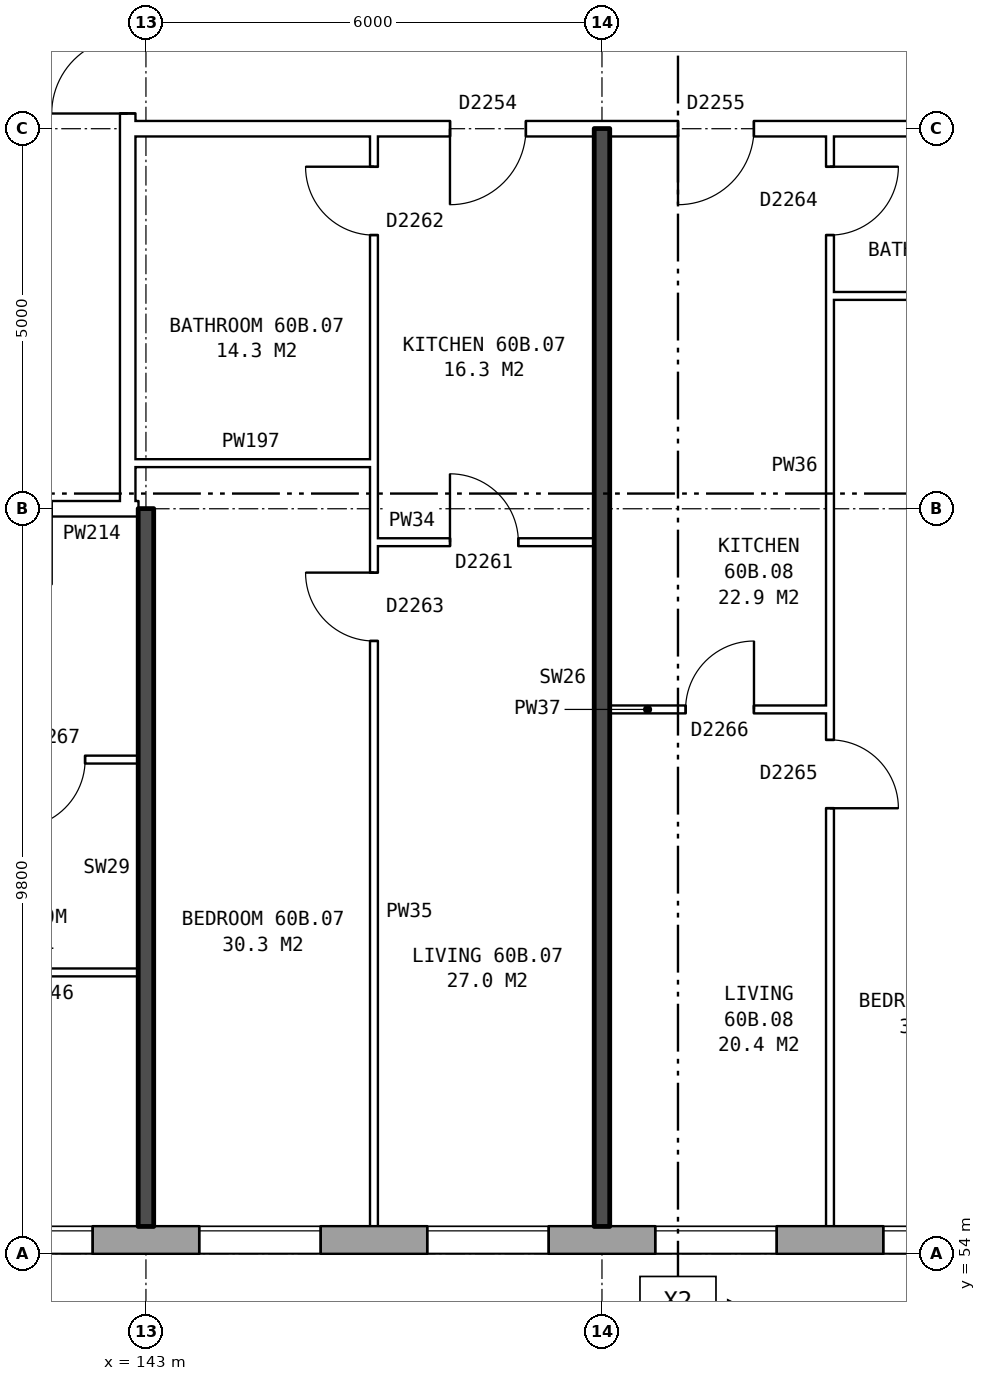
"""IFC4 building model, lengths in metres.
Left out: names, types, materials, properties, quantities, classifications, styles, units other than length and angle.
Written with IfcOpenShell. Run it as: python <this file> out.ifc"""

import sys

from ifc_helpers import new_model, si_unit, direction, frame, frame_2d, origin, place, context, subcontext, project, spatial, rectangle, extrude, element, fill, save


model = new_model("IFC4")
c1 = context("Model", 3, precision=1e-05, world=origin(), true_north=direction((0.0, 1.0)))
c2 = subcontext(c1, "Body", "Model", "MODEL_VIEW")
j1 = project(units=[si_unit("LENGTHUNIT", "METRE"), si_unit("PLANEANGLEUNIT", "RADIAN")], contexts=[c1])
p1 = place(None, origin())
s1 = spatial("IfcSite", under=j1, at=p1, CompositionType="ELEMENT")
p2 = place(p1, origin())
s2 = spatial("IfcBuilding", under=s1, at=p2, CompositionType="ELEMENT")
p3 = place(p2, frame((0.0, 0.0, 212.1)))
s3 = spatial("IfcBuildingStorey", under=s2, at=p3, CompositionType="ELEMENT", Elevation=212.1)
p4 = place(p3, frame((132.05, 54.18, 0.0), z_axis=(0.0, 0.0, 1.0), x_axis=(1.0, 0.0, 0.0)))
e1 = element("IfcWall", 1, at=p4, inside=s3, PredefinedType="STANDARD", context=c2, shape_type="SweptSolid", body=[
    extrude(rectangle(XDim=33.875, YDim=0.36, at=frame_2d((16.938, 0.0))), origin(), (0.0, 0.0, 1.0), 2.85),
])
p5 = place(p4, frame((2.65, 0.0, 0.8)))
e2 = element("IfcOpeningElement", 2, at=p5, cuts=e1, PredefinedType="OPENING", context=c2, shape_type="SweptSolid", body=[
    extrude(rectangle(XDim=1.6, YDim=1.8, at=frame_2d((0.8, 0.9))), frame((0.0, 0.19, 0.0), z_axis=(0.0, -1.0, 0.0), x_axis=(1.0, 0.0, 0.0)), (0.0, 0.0, 1.0), 0.38),
])
p6 = place(p4, frame((6.6, 0.0, 0.8)))
e3 = element("IfcOpeningElement", 3, at=p6, cuts=e1, PredefinedType="OPENING", context=c2, shape_type="SweptSolid", body=[
    extrude(rectangle(XDim=1.6, YDim=1.8, at=frame_2d((0.8, 0.9))), frame((0.0, 0.19, 0.0), z_axis=(0.0, -1.0, 0.0), x_axis=(1.0, 0.0, 0.0)), (0.0, 0.0, 1.0), 0.38),
])
p7 = place(p4, frame((8.65, 0.0, 0.8)))
e4 = element("IfcOpeningElement", 4, at=p7, cuts=e1, PredefinedType="OPENING", context=c2, shape_type="SweptSolid", body=[
    extrude(rectangle(XDim=1.6, YDim=1.8, at=frame_2d((0.8, 0.9))), frame((0.0, 0.19, 0.0), z_axis=(0.0, -1.0, 0.0), x_axis=(1.0, 0.0, 0.0)), (0.0, 0.0, 1.0), 0.38),
])
p8 = place(p4, frame((11.65, 0.0, 0.8)))
e5 = element("IfcOpeningElement", 5, at=p8, cuts=e1, PredefinedType="OPENING", context=c2, shape_type="SweptSolid", body=[
    extrude(rectangle(XDim=1.6, YDim=1.8, at=frame_2d((0.8, 0.9))), frame((0.0, 0.19, 0.0), z_axis=(0.0, -1.0, 0.0), x_axis=(1.0, 0.0, 0.0)), (0.0, 0.0, 1.0), 0.38),
])
p9 = place(p4, frame((14.65, 0.0, 0.8)))
e6 = element("IfcOpeningElement", 6, at=p9, cuts=e1, PredefinedType="OPENING", context=c2, shape_type="SweptSolid", body=[
    extrude(rectangle(XDim=1.6, YDim=1.8, at=frame_2d((0.8, 0.9))), frame((0.0, 0.19, 0.0), z_axis=(0.0, -1.0, 0.0), x_axis=(1.0, 0.0, 0.0)), (0.0, 0.0, 1.0), 0.38),
])
p10 = place(p4, frame((17.65, 0.0, 0.8)))
e7 = element("IfcOpeningElement", 7, at=p10, cuts=e1, PredefinedType="OPENING", context=c2, shape_type="SweptSolid", body=[
    extrude(rectangle(XDim=1.6, YDim=1.8, at=frame_2d((0.8, 0.9))), frame((0.0, 0.19, 0.0), z_axis=(0.0, -1.0, 0.0), x_axis=(1.0, 0.0, 0.0)), (0.0, 0.0, 1.0), 0.38),
])
p11 = place(p4, frame((20.65, 0.0, 0.8)))
e8 = element("IfcOpeningElement", 8, at=p11, cuts=e1, PredefinedType="OPENING", context=c2, shape_type="SweptSolid", body=[
    extrude(rectangle(XDim=1.6, YDim=1.8, at=frame_2d((0.8, 0.9))), frame((0.0, 0.19, 0.0), z_axis=(0.0, -1.0, 0.0), x_axis=(1.0, 0.0, 0.0)), (0.0, 0.0, 1.0), 0.38),
])
p12 = place(p4, frame((23.65, 0.0, 0.8)))
e9 = element("IfcOpeningElement", 9, at=p12, cuts=e1, PredefinedType="OPENING", context=c2, shape_type="SweptSolid", body=[
    extrude(rectangle(XDim=1.6, YDim=1.8, at=frame_2d((0.8, 0.9))), frame((0.0, 0.19, 0.0), z_axis=(0.0, -1.0, 0.0), x_axis=(1.0, 0.0, 0.0)), (0.0, 0.0, 1.0), 0.38),
])
p13 = place(p4, frame((26.65, 0.0, 0.8)))
e10 = element("IfcOpeningElement", 10, at=p13, cuts=e1, PredefinedType="OPENING", context=c2, shape_type="SweptSolid", body=[
    extrude(rectangle(XDim=1.6, YDim=1.8, at=frame_2d((0.8, 0.9))), frame((0.0, 0.19, 0.0), z_axis=(0.0, -1.0, 0.0), x_axis=(1.0, 0.0, 0.0)), (0.0, 0.0, 1.0), 0.38),
])
p14 = place(p4, frame((29.15, 0.0, 0.8)))
e11 = element("IfcOpeningElement", 11, at=p14, cuts=e1, PredefinedType="OPENING", context=c2, shape_type="SweptSolid", body=[
    extrude(rectangle(XDim=0.6, YDim=0.9, at=frame_2d((0.3, 0.45))), frame((0.0, 0.19, 0.0), z_axis=(0.0, -1.0, 0.0), x_axis=(1.0, 0.0, 0.0)), (0.0, 0.0, 1.0), 0.38),
])
p15 = place(p4, frame((31.25, 0.0, 1.1)))
e12 = element("IfcOpeningElement", 12, at=p15, cuts=e1, PredefinedType="OPENING", context=c2, shape_type="SweptSolid", body=[
    extrude(rectangle(XDim=1.4, YDim=1.5, at=frame_2d((0.7, 0.75))), frame((0.0, 0.19, 0.0), z_axis=(0.0, -1.0, 0.0), x_axis=(1.0, 0.0, 0.0)), (0.0, 0.0, 1.0), 0.38),
])
p16 = place(p4, frame((32.95, 0.0, 0.8)))
e13 = element("IfcOpeningElement", 13, at=p16, cuts=e1, PredefinedType="OPENING", context=c2, shape_type="SweptSolid", body=[
    extrude(rectangle(XDim=0.6, YDim=1.8, at=frame_2d((0.3, 0.9))), frame((0.0, 0.19, 0.0), z_axis=(0.0, -1.0, 0.0), x_axis=(1.0, 0.0, 0.0)), (0.0, 0.0, 1.0), 0.38),
])
p17 = place(p3, frame((142.76, 63.9, 0.0), z_axis=(0.0, 0.0, 1.0), x_axis=(0.0, 1.0, 0.0)))
e14 = element("IfcWall", 14, at=p17, inside=s3, PredefinedType="PARTITIONING", context=c2, shape_type="SweptSolid", body=[
    extrude(rectangle(XDim=12.2, YDim=0.2, at=frame_2d((6.1, 0.0))), origin(), (0.0, 0.0, 1.0), 2.85),
])
p18 = place(p17, frame((5.1, 0.0, 0.0)))
e15 = element("IfcOpeningElement", 15, at=p18, cuts=e14, PredefinedType="OPENING", context=c2, shape_type="SweptSolid", body=[
    extrude(rectangle(XDim=2.0, YDim=2.1, at=frame_2d((1.0, 1.05))), frame((0.0, 0.11, 0.0), z_axis=(0.0, -1.0, 0.0), x_axis=(1.0, 0.0, 0.0)), (0.0, 0.0, 1.0), 0.22),
])
p19 = place(p3, frame((140.6, 57.7, 0.0), z_axis=(0.0, 0.0, 1.0), x_axis=(1.0, 0.0, 0.0)))
e16 = element("IfcWall", 16, at=p19, inside=s3, PredefinedType="PARTITIONING", context=c2, shape_type="SweptSolid", body=[
    extrude(rectangle(XDim=2.3, YDim=0.1, at=frame_2d((1.15, 0.0))), origin(), (0.0, 0.0, 1.0), 2.85),
])
p20 = place(p3, frame((131.1, 60.5, 0.0), z_axis=(0.0, 0.0, 1.0), x_axis=(1.0, 0.0, 0.0)))
e17 = element("IfcWall", 17, at=p20, inside=s3, PredefinedType="PARTITIONING", context=c2, shape_type="SweptSolid", body=[
    extrude(rectangle(XDim=11.8, YDim=0.1, at=frame_2d((5.9, 0.0))), origin(), (0.0, 0.0, 1.0), 2.85),
])
p21 = place(p20, frame((7.25, 0.0, 0.0)))
e18 = element("IfcOpeningElement", 18, at=p21, cuts=e17, PredefinedType="OPENING", context=c2, shape_type="SweptSolid", body=[
    extrude(rectangle(XDim=0.9, YDim=2.1, at=frame_2d((0.45, 1.05))), frame((0.0, 0.06, 0.0), z_axis=(0.0, -1.0, 0.0), x_axis=(1.0, 0.0, 0.0)), (0.0, 0.0, 1.0), 0.12),
])
p22 = place(p20, frame((10.2, 0.0, 0.0)))
e19 = element("IfcOpeningElement", 19, at=p22, cuts=e17, PredefinedType="OPENING", context=c2, shape_type="SweptSolid", body=[
    extrude(rectangle(XDim=0.9, YDim=2.1, at=frame_2d((0.45, 1.05))), frame((0.0, 0.06, 0.0), z_axis=(0.0, -1.0, 0.0), x_axis=(1.0, 0.0, 0.0)), (0.0, 0.0, 1.0), 0.12),
])
p23 = place(p3, frame((149.1, 61.16, 0.0), z_axis=(0.0, 0.0, 1.0), x_axis=(1.0, 0.0, 0.0)))
e20 = element("IfcWall", 20, at=p23, inside=s3, PredefinedType="PARTITIONING", context=c2, shape_type="SweptSolid", body=[
    extrude(rectangle(XDim=2.9, YDim=0.1, at=frame_2d((1.45, 0.0))), origin(), (0.0, 0.0, 1.0), 2.85),
])
p24 = place(p23, frame((1.0, 0.0, 0.0)))
e21 = element("IfcOpeningElement", 21, at=p24, cuts=e20, PredefinedType="OPENING", context=c2, shape_type="SweptSolid", body=[
    extrude(rectangle(XDim=0.9, YDim=2.1, at=frame_2d((0.45, 1.05))), frame((0.0, 0.06, 0.0), z_axis=(0.0, -1.0, 0.0), x_axis=(1.0, 0.0, 0.0)), (0.0, 0.0, 1.0), 0.12),
])
p25 = place(p3, frame((146.0, 63.36, 0.0), z_axis=(0.0, 0.0, 1.0), x_axis=(1.0, 0.0, 0.0)))
e22 = element("IfcWall", 22, at=p25, inside=s3, PredefinedType="PARTITIONING", context=c2, shape_type="SweptSolid", body=[
    extrude(rectangle(XDim=2.9, YDim=0.1, at=frame_2d((1.45, 0.0))), origin(), (0.0, 0.0, 1.0), 2.85),
])
p26 = place(p25, frame((1.0, 0.0, 0.0)))
e23 = element("IfcOpeningElement", 23, at=p26, cuts=e22, PredefinedType="OPENING", context=c2, shape_type="SweptSolid", body=[
    extrude(rectangle(XDim=0.9, YDim=2.1, at=frame_2d((0.45, 1.05))), frame((0.0, 0.06, 0.0), z_axis=(0.0, -1.0, 0.0), x_axis=(1.0, 0.0, 0.0)), (0.0, 0.0, 1.0), 0.12),
])
p27 = place(p3, frame((139.76, 63.8, 0.0), z_axis=(0.0, 0.0, 1.0), x_axis=(1.0, 0.0, 0.0)))
e24 = element("IfcWall", 24, at=p27, inside=s3, PredefinedType="PARTITIONING", context=c2, shape_type="SweptSolid", body=[
    extrude(rectangle(XDim=3.0, YDim=0.2, at=frame_2d((1.5, 0.0))), origin(), (0.0, 0.0, 1.0), 2.85),
])
p28 = place(p27, frame((1.0, 0.0, 0.0)))
e25 = element("IfcOpeningElement", 25, at=p28, cuts=e24, PredefinedType="OPENING", context=c2, shape_type="SweptSolid", body=[
    extrude(rectangle(XDim=1.0, YDim=2.1, at=frame_2d((0.5, 1.05))), frame((0.0, 0.11, 0.0), z_axis=(0.0, -1.0, 0.0), x_axis=(1.0, 0.0, 0.0)), (0.0, 0.0, 1.0), 0.22),
])
p29 = place(p3, frame((142.76, 63.8, 0.0), z_axis=(0.0, 0.0, 1.0), x_axis=(1.0, 0.0, 0.0)))
e26 = element("IfcWall", 26, at=p29, inside=s3, PredefinedType="PARTITIONING", context=c2, shape_type="SweptSolid", body=[
    extrude(rectangle(XDim=0.14, YDim=0.2, at=frame_2d((0.07, 0.0))), origin(), (0.0, 0.0, 1.0), 2.85),
])
p30 = place(p3, frame((142.76, 64.4, 0.0), z_axis=(0.0, 0.0, 1.0), x_axis=(1.0, 0.0, 0.0)))
e27 = element("IfcWall", 27, at=p30, inside=s3, PredefinedType="PARTITIONING", context=c2, shape_type="SweptSolid", body=[
    extrude(rectangle(XDim=3.24, YDim=0.1, at=frame_2d((1.62, 0.0))), origin(), (0.0, 0.0, 1.0), 2.85),
])
p31 = place(p3, frame((152.0, 66.6, 0.0), z_axis=(0.0, 0.0, 1.0), x_axis=(1.0, 0.0, 0.0)))
e28 = element("IfcWall", 28, at=p31, inside=s3, PredefinedType="PARTITIONING", context=c2, shape_type="SweptSolid", body=[
    extrude(rectangle(XDim=2.9, YDim=0.1, at=frame_2d((1.45, 0.0))), origin(), (0.0, 0.0, 1.0), 2.85),
])
p32 = place(p3, frame((142.76, 68.8, 0.0), z_axis=(0.0, 0.0, 1.0), x_axis=(1.0, 0.0, 0.0)))
e29 = element("IfcWall", 29, at=p32, inside=s3, PredefinedType="PARTITIONING", context=c2, shape_type="SweptSolid", body=[
    extrude(rectangle(XDim=14.48, YDim=0.2, at=frame_2d((7.24, 0.0))), origin(), (0.0, 0.0, 1.0), 2.85),
])
p33 = place(p32, frame((4.24, 0.0, 0.0)))
e30 = element("IfcOpeningElement", 30, at=p33, cuts=e29, PredefinedType="OPENING", context=c2, shape_type="SweptSolid", body=[
    extrude(rectangle(XDim=1.0, YDim=2.1, at=frame_2d((0.5, 1.05))), frame((0.0, 0.11, 0.0), z_axis=(0.0, -1.0, 0.0), x_axis=(1.0, 0.0, 0.0)), (0.0, 0.0, 1.0), 0.22),
])
p34 = place(p32, frame((7.24, 0.0, 0.0)))
e31 = element("IfcOpeningElement", 31, at=p34, cuts=e29, PredefinedType="OPENING", context=c2, shape_type="SweptSolid", body=[
    extrude(rectangle(XDim=1.0, YDim=2.1, at=frame_2d((0.5, 1.05))), frame((0.0, 0.11, 0.0), z_axis=(0.0, -1.0, 0.0), x_axis=(1.0, 0.0, 0.0)), (0.0, 0.0, 1.0), 0.22),
])
p35 = place(p3, frame((143.0, 54.36, 0.0), z_axis=(0.0, 0.0, 1.0), x_axis=(0.0, 1.0, 0.0)))
e32 = element("IfcWall", 32, at=p35, inside=s3, PredefinedType="SOLIDWALL", context=c2, shape_type="SweptSolid", body=[
    extrude(rectangle(XDim=9.44, YDim=0.2, at=frame_2d((4.72, 0.0))), origin(), (0.0, 0.0, 1.0), 2.85),
])
p36 = place(p3, frame((146.0, 54.36, 0.0), z_axis=(0.0, 0.0, 1.0), x_axis=(0.0, 1.0, 0.0)))
e33 = element("IfcWall", 33, at=p36, inside=s3, PredefinedType="PARTITIONING", context=c2, shape_type="SweptSolid", body=[
    extrude(rectangle(XDim=14.34, YDim=0.1, at=frame_2d((7.17, 0.0))), origin(), (0.0, 0.0, 1.0), 2.85),
])
p37 = place(p36, frame((7.7, 0.0, 0.0)))
e34 = element("IfcOpeningElement", 34, at=p37, cuts=e33, PredefinedType="OPENING", context=c2, shape_type="SweptSolid", body=[
    extrude(rectangle(XDim=0.9, YDim=2.1, at=frame_2d((0.45, 1.05))), frame((0.0, 0.06, 0.0), z_axis=(0.0, -1.0, 0.0), x_axis=(1.0, 0.0, 0.0)), (0.0, 0.0, 1.0), 0.12),
])
p38 = place(p36, frame((13.04, 0.0, 0.0)))
e35 = element("IfcOpeningElement", 35, at=p38, cuts=e33, PredefinedType="OPENING", context=c2, shape_type="SweptSolid", body=[
    extrude(rectangle(XDim=0.9, YDim=2.1, at=frame_2d((0.45, 1.05))), frame((0.0, 0.06, 0.0), z_axis=(0.0, -1.0, 0.0), x_axis=(1.0, 0.0, 0.0)), (0.0, 0.0, 1.0), 0.12),
])
p39 = place(p3, frame((149.0, 54.36, 0.0), z_axis=(0.0, 0.0, 1.0), x_axis=(0.0, 1.0, 0.0)))
e36 = element("IfcWall", 36, at=p39, inside=s3, PredefinedType="SOLIDWALL", context=c2, shape_type="SweptSolid", body=[
    extrude(rectangle(XDim=14.44, YDim=0.2, at=frame_2d((7.22, 0.0))), origin(), (0.0, 0.0, 1.0), 2.85),
])
p40 = place(p3, frame((152.0, 54.36, 0.0), z_axis=(0.0, 0.0, 1.0), x_axis=(0.0, 1.0, 0.0)))
e37 = element("IfcWall", 37, at=p40, inside=s3, PredefinedType="PARTITIONING", context=c2, shape_type="SweptSolid", body=[
    extrude(rectangle(XDim=14.34, YDim=0.1, at=frame_2d((7.17, 0.0))), origin(), (0.0, 0.0, 1.0), 2.85),
])
p41 = place(p40, frame((5.5, 0.0, 0.0)))
e38 = element("IfcOpeningElement", 38, at=p41, cuts=e37, PredefinedType="OPENING", context=c2, shape_type="SweptSolid", body=[
    extrude(rectangle(XDim=0.9, YDim=2.1, at=frame_2d((0.45, 1.05))), frame((0.0, 0.06, 0.0), z_axis=(0.0, -1.0, 0.0), x_axis=(1.0, 0.0, 0.0)), (0.0, 0.0, 1.0), 0.12),
])
p42 = place(p40, frame((13.04, 0.0, 0.0)))
e39 = element("IfcOpeningElement", 39, at=p42, cuts=e37, PredefinedType="OPENING", context=c2, shape_type="SweptSolid", body=[
    extrude(rectangle(XDim=0.9, YDim=2.1, at=frame_2d((0.45, 1.05))), frame((0.0, 0.06, 0.0), z_axis=(0.0, -1.0, 0.0), x_axis=(1.0, 0.0, 0.0)), (0.0, 0.0, 1.0), 0.12),
])
p43 = place(p7, origin())
e40 = element("IfcWindow", 40, at=p43, inside=s3, PartitioningType="SINGLE_PANEL", PredefinedType="WINDOW", context=c2, shape_type="SweptSolid", body=[
    extrude(rectangle(XDim=1.6, YDim=1.8, at=frame_2d((0.8, 0.9))), frame((0.0, 0.15, 0.0), z_axis=(0.0, -1.0, 0.0), x_axis=(1.0, 0.0, 0.0)), (0.0, 0.0, 1.0), 0.06),
])
fill(e4, e40)
p44 = place(p8, origin())
e41 = element("IfcWindow", 41, at=p44, inside=s3, PartitioningType="SINGLE_PANEL", PredefinedType="WINDOW", context=c2, shape_type="SweptSolid", body=[
    extrude(rectangle(XDim=1.6, YDim=1.8, at=frame_2d((0.8, 0.9))), frame((0.0, 0.15, 0.0), z_axis=(0.0, -1.0, 0.0), x_axis=(1.0, 0.0, 0.0)), (0.0, 0.0, 1.0), 0.06),
])
fill(e5, e41)
p45 = place(p9, origin())
e42 = element("IfcWindow", 42, at=p45, inside=s3, PartitioningType="SINGLE_PANEL", PredefinedType="WINDOW", context=c2, shape_type="SweptSolid", body=[
    extrude(rectangle(XDim=1.6, YDim=1.8, at=frame_2d((0.8, 0.9))), frame((0.0, 0.15, 0.0), z_axis=(0.0, -1.0, 0.0), x_axis=(1.0, 0.0, 0.0)), (0.0, 0.0, 1.0), 0.06),
])
fill(e6, e42)
p46 = place(p10, origin())
e43 = element("IfcWindow", 43, at=p46, inside=s3, PartitioningType="SINGLE_PANEL", PredefinedType="WINDOW", context=c2, shape_type="SweptSolid", body=[
    extrude(rectangle(XDim=1.6, YDim=1.8, at=frame_2d((0.8, 0.9))), frame((0.0, 0.15, 0.0), z_axis=(0.0, -1.0, 0.0), x_axis=(1.0, 0.0, 0.0)), (0.0, 0.0, 1.0), 0.06),
])
fill(e7, e43)
p47 = place(p11, origin())
e44 = element("IfcWindow", 44, at=p47, inside=s3, PartitioningType="SINGLE_PANEL", PredefinedType="WINDOW", context=c2, shape_type="SweptSolid", body=[
    extrude(rectangle(XDim=1.6, YDim=1.8, at=frame_2d((0.8, 0.9))), frame((0.0, 0.15, 0.0), z_axis=(0.0, -1.0, 0.0), x_axis=(1.0, 0.0, 0.0)), (0.0, 0.0, 1.0), 0.06),
])
fill(e8, e44)
p48 = place(p18, origin())
e45 = element("IfcDoor", 45, at=p48, inside=s3, OperationType="DOUBLE_DOOR_SINGLE_SWING", PredefinedType="DOOR", context=c2, shape_type="SweptSolid", body=[
    extrude(rectangle(XDim=2.0, YDim=2.1, at=frame_2d((1.0, 1.05))), frame((0.0, 0.025, 0.0), z_axis=(0.0, -1.0, 0.0), x_axis=(1.0, 0.0, 0.0)), (0.0, 0.0, 1.0), 0.05),
])
fill(e15, e45)
p49 = place(p22, frame((0.9, 0.0, 0.0), z_axis=(0.0, 0.0, 1.0), x_axis=(-1.0, 0.0, 0.0)))
e46 = element("IfcDoor", 46, at=p49, inside=s3, OperationType="SINGLE_SWING_RIGHT", PredefinedType="DOOR", context=c2, shape_type="SweptSolid", body=[
    extrude(rectangle(XDim=0.9, YDim=2.1, at=frame_2d((0.45, 1.05))), frame((0.0, 0.025, 0.0), z_axis=(0.0, -1.0, 0.0), x_axis=(1.0, 0.0, 0.0)), (0.0, 0.0, 1.0), 0.05),
])
fill(e19, e46)
p50 = place(p37, origin())
e47 = element("IfcDoor", 47, at=p50, inside=s3, OperationType="SINGLE_SWING_RIGHT", PredefinedType="DOOR", context=c2, shape_type="SweptSolid", body=[
    extrude(rectangle(XDim=0.9, YDim=2.1, at=frame_2d((0.45, 1.05))), frame((0.0, 0.025, 0.0), z_axis=(0.0, -1.0, 0.0), x_axis=(1.0, 0.0, 0.0)), (0.0, 0.0, 1.0), 0.05),
])
fill(e34, e47)
p51 = place(p33, frame((1.0, 0.0, 0.0), z_axis=(0.0, 0.0, 1.0), x_axis=(-1.0, 0.0, 0.0)))
e48 = element("IfcDoor", 48, at=p51, inside=s3, OperationType="SINGLE_SWING_RIGHT", PredefinedType="DOOR", context=c2, shape_type="SweptSolid", body=[
    extrude(rectangle(XDim=1.0, YDim=2.1, at=frame_2d((0.5, 1.05))), frame((0.0, 0.025, 0.0), z_axis=(0.0, -1.0, 0.0), x_axis=(1.0, 0.0, 0.0)), (0.0, 0.0, 1.0), 0.05),
])
fill(e30, e48)
p52 = place(p26, origin())
e49 = element("IfcDoor", 49, at=p52, inside=s3, OperationType="SINGLE_SWING_LEFT", PredefinedType="DOOR", context=c2, shape_type="SweptSolid", body=[
    extrude(rectangle(XDim=0.9, YDim=2.1, at=frame_2d((0.45, 1.05))), frame((0.0, 0.025, 0.0), z_axis=(0.0, -1.0, 0.0), x_axis=(1.0, 0.0, 0.0)), (0.0, 0.0, 1.0), 0.05),
])
fill(e23, e49)
p53 = place(p38, origin())
e50 = element("IfcDoor", 50, at=p53, inside=s3, OperationType="SINGLE_SWING_RIGHT", PredefinedType="DOOR", context=c2, shape_type="SweptSolid", body=[
    extrude(rectangle(XDim=0.9, YDim=2.1, at=frame_2d((0.45, 1.05))), frame((0.0, 0.025, 0.0), z_axis=(0.0, -1.0, 0.0), x_axis=(1.0, 0.0, 0.0)), (0.0, 0.0, 1.0), 0.05),
])
fill(e35, e50)
p54 = place(p41, frame((0.9, 0.0, 0.0), z_axis=(0.0, 0.0, 1.0), x_axis=(-1.0, 0.0, 0.0)))
e51 = element("IfcDoor", 51, at=p54, inside=s3, OperationType="SINGLE_SWING_RIGHT", PredefinedType="DOOR", context=c2, shape_type="SweptSolid", body=[
    extrude(rectangle(XDim=0.9, YDim=2.1, at=frame_2d((0.45, 1.05))), frame((0.0, 0.025, 0.0), z_axis=(0.0, -1.0, 0.0), x_axis=(1.0, 0.0, 0.0)), (0.0, 0.0, 1.0), 0.05),
])
fill(e38, e51)
p55 = place(p34, frame((1.0, 0.0, 0.0), z_axis=(0.0, 0.0, 1.0), x_axis=(-1.0, 0.0, 0.0)))
e52 = element("IfcDoor", 52, at=p55, inside=s3, OperationType="SINGLE_SWING_RIGHT", PredefinedType="DOOR", context=c2, shape_type="SweptSolid", body=[
    extrude(rectangle(XDim=1.0, YDim=2.1, at=frame_2d((0.5, 1.05))), frame((0.0, 0.025, 0.0), z_axis=(0.0, -1.0, 0.0), x_axis=(1.0, 0.0, 0.0)), (0.0, 0.0, 1.0), 0.05),
])
fill(e31, e52)
p56 = place(p24, origin())
e53 = element("IfcDoor", 53, at=p56, inside=s3, OperationType="SINGLE_SWING_RIGHT", PredefinedType="DOOR", context=c2, shape_type="SweptSolid", body=[
    extrude(rectangle(XDim=0.9, YDim=2.1, at=frame_2d((0.45, 1.05))), frame((0.0, 0.025, 0.0), z_axis=(0.0, -1.0, 0.0), x_axis=(1.0, 0.0, 0.0)), (0.0, 0.0, 1.0), 0.05),
])
fill(e21, e53)
p57 = place(p42, frame((0.9, 0.0, 0.0), z_axis=(0.0, 0.0, 1.0), x_axis=(-1.0, 0.0, 0.0)))
e54 = element("IfcDoor", 54, at=p57, inside=s3, OperationType="SINGLE_SWING_LEFT", PredefinedType="DOOR", context=c2, shape_type="SweptSolid", body=[
    extrude(rectangle(XDim=0.9, YDim=2.1, at=frame_2d((0.45, 1.05))), frame((0.0, 0.025, 0.0), z_axis=(0.0, -1.0, 0.0), x_axis=(1.0, 0.0, 0.0)), (0.0, 0.0, 1.0), 0.05),
])
fill(e39, e54)
save(model, sys.argv[1])
